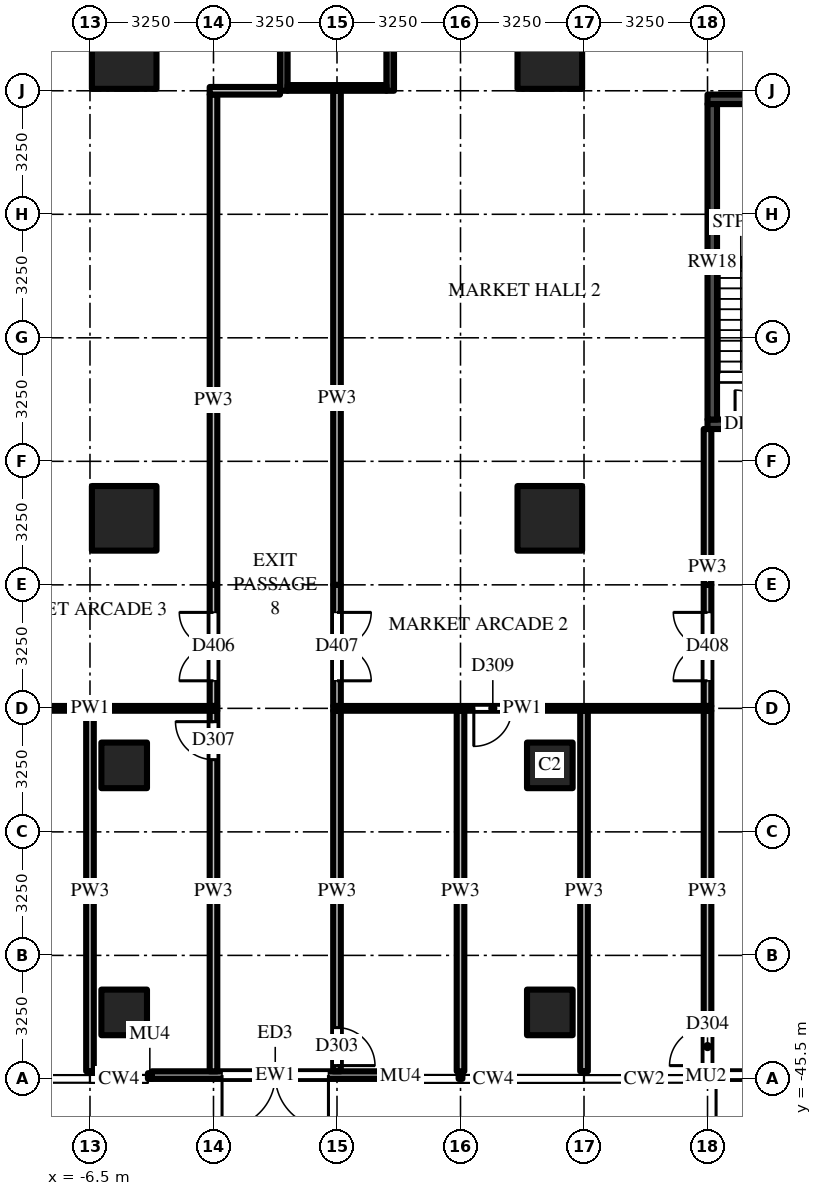
"""IFC4 building model, lengths in metres.
Left out: names, types, materials, properties, quantities, classifications, styles, units other than length and angle.
Written with IfcOpenShell. Run it as: python <this file> out.ifc"""

import sys

from ifc_helpers import new_model, si_unit, direction, frame, frame_2d, origin, origin_2d, place, context, subcontext, project, spatial, rectangle, extrude, source, transform, mapped, element, fill, save


model = new_model("IFC4")
c1 = context("Model", 3, precision=1e-05, world=origin(), true_north=direction((0.0, 1.0)))
c2 = subcontext(c1, "Body", "Model", "MODEL_VIEW")
j1 = project(units=[si_unit("LENGTHUNIT", "METRE"), si_unit("PLANEANGLEUNIT", "RADIAN")], contexts=[c1])
p1 = place(None, origin())
s1 = spatial("IfcSite", under=j1, at=p1, CompositionType="ELEMENT")
p2 = place(p1, origin())
s2 = spatial("IfcBuilding", under=s1, at=p2, CompositionType="ELEMENT")
p3 = place(p2, origin())
s3 = spatial("IfcBuildingStorey", under=s2, at=p3, CompositionType="ELEMENT", Elevation=0.0)
m1 = source(origin(), c2, "Body", "SweptSolid", [
    extrude(rectangle(XDim=1.7, YDim=1.7, at=origin_2d()), origin(), (0.0, 0.0, 1.0), 8.5),
])
for number, where, z_axis, x_axis in (
    (1, (5.6, -18.6, -0.5), (0.0, 0.0, 1.0), (1.0, 0.0, 0.0)),
    (2, (5.6, -30.75, -0.5), (0.0, 0.0, 1.0), (1.0, 0.0, 0.0)),
):
    element("IfcColumn", number, at=place(p3, frame(where, z_axis=z_axis, x_axis=x_axis)), inside=s3, PredefinedType="COLUMN", context=c2, shape_type="MappedRepresentation", body=[
        mapped(m1, transform((0.0, 0.0, 0.0))),
    ])
m2 = source(origin(), c2, "Body", "SweptSolid", [
    extrude(rectangle(XDim=1.2, YDim=1.2, at=origin_2d()), origin(), (0.0, 0.0, 1.0), 8.5),
])
for number, where, z_axis, x_axis in (
    (3, (5.6, -37.25, -0.5), (0.0, 0.0, 1.0), (1.0, 0.0, 0.0)),
    (4, (5.6, -43.75, -0.5), (0.0, 0.0, 1.0), (1.0, 0.0, 0.0)),
):
    element("IfcColumn", number, at=place(p3, frame(where, z_axis=z_axis, x_axis=x_axis)), inside=s3, PredefinedType="COLUMN", context=c2, shape_type="MappedRepresentation", body=[
        mapped(m2, transform((0.0, 0.0, 0.0))),
    ])
for number, where, z_axis, x_axis in (
    (5, (-5.6, -18.6, -0.5), (0.0, 0.0, 1.0), (1.0, 0.0, 0.0)),
    (6, (-5.6, -30.75, -0.5), (0.0, 0.0, 1.0), (1.0, 0.0, 0.0)),
):
    element("IfcColumn", number, at=place(p3, frame(where, z_axis=z_axis, x_axis=x_axis)), inside=s3, PredefinedType="COLUMN", context=c2, shape_type="MappedRepresentation", body=[
        mapped(m1, transform((0.0, 0.0, 0.0))),
    ])
for number, where, z_axis, x_axis in (
    (7, (-5.6, -37.25, -0.5), (0.0, 0.0, 1.0), (1.0, 0.0, 0.0)),
    (8, (-5.6, -43.75, -0.5), (0.0, 0.0, 1.0), (1.0, 0.0, 0.0)),
):
    element("IfcColumn", number, at=place(p3, frame(where, z_axis=z_axis, x_axis=x_axis)), inside=s3, PredefinedType="COLUMN", context=c2, shape_type="MappedRepresentation", body=[
        mapped(m2, transform((0.0, 0.0, 0.0))),
    ])
m3 = source(origin(), c2, "Body", "SweptSolid", [
    extrude(rectangle(XDim=6.0, YDim=0.2, at=frame_2d((3.0, 0.0))), origin(), (0.0, 0.0, 1.0), 7.7),
])
for number, where, z_axis, x_axis in (
    (9, (1.4, -13.5, 0.0), (0.0, 0.0, 1.0), (0.0, -1.0, 0.0)),
    (10, (-1.4, -13.5, 0.0), (0.0, 0.0, 1.0), (0.0, -1.0, 0.0)),
):
    element("IfcWall", number, at=place(p3, frame(where, z_axis=z_axis, x_axis=x_axis)), inside=s3, PredefinedType="SHEAR", context=c2, shape_type="MappedRepresentation", body=[
        mapped(m3, transform((0.0, 0.0, 0.0))),
    ])
m4 = source(origin(), c2, "Body", "SweptSolid", [
    extrude(rectangle(XDim=2.6, YDim=0.15, at=frame_2d((1.3, 0.0))), origin(), (0.0, 0.0, 1.0), 7.7),
])
p4 = place(p3, frame((1.3, -19.425, 0.0), z_axis=(0.0, 0.0, 1.0), x_axis=(-1.0, 0.0, 0.0)))
e11 = element("IfcWall", 11, at=p4, inside=s3, PredefinedType="SHEAR", context=c2, shape_type="MappedRepresentation", body=[
    mapped(m4, transform((0.0, 0.0, 0.0))),
])
m5 = source(origin(), c2, "Body", "SweptSolid", [
    extrude(rectangle(XDim=6.5, YDim=0.25, at=frame_2d((3.25, 0.0))), origin(), (0.0, 0.0, 1.0), 7.7),
])
p5 = place(p3, frame((9.75, -28.275, 0.0), z_axis=(0.0, 0.0, 1.0), x_axis=(1.0, 0.0, 0.0)))
e12 = element("IfcWall", 12, at=p5, inside=s3, PredefinedType="SHEAR", context=c2, shape_type="MappedRepresentation", body=[
    mapped(m5, transform((0.0, 0.0, 0.0))),
])
m6 = source(origin(), c2, "Body", "SweptSolid", [
    extrude(rectangle(XDim=1.8, YDim=2.1, at=frame_2d((0.9, 1.05))), frame((0.0, 0.135, 0.0), z_axis=(0.0, -1.0, 0.0), x_axis=(1.0, 0.0, 0.0)), (0.0, 0.0, 1.0), 0.27),
])
p6 = place(p5, frame((0.725, 0.0, 0.0)))
e13 = element("IfcOpeningElement", 13, at=p6, cuts=e12, PredefinedType="OPENING", context=c2, shape_type="MappedRepresentation", body=[
    mapped(m6, transform((0.0, 0.0, 0.0))),
])
p7 = place(p5, frame((3.975, 0.0, 0.0)))
e14 = element("IfcOpeningElement", 14, at=p7, cuts=e12, PredefinedType="OPENING", context=c2, shape_type="MappedRepresentation", body=[
    mapped(m6, transform((0.0, 0.0, 0.0))),
])
p8 = place(p3, frame((9.75, -19.725, 0.0), z_axis=(0.0, 0.0, 1.0), x_axis=(1.0, 0.0, 0.0)))
e15 = element("IfcWall", 15, at=p8, inside=s3, PredefinedType="SHEAR", context=c2, shape_type="MappedRepresentation", body=[
    mapped(m5, transform((0.0, 0.0, 0.0))),
])
m7 = source(origin(), c2, "Body", "SweptSolid", [
    extrude(rectangle(XDim=8.3, YDim=0.25, at=frame_2d((4.15, 0.0))), origin(), (0.0, 0.0, 1.0), 7.7),
])
p9 = place(p3, frame((9.875, -28.15, 0.0), z_axis=(0.0, 0.0, 1.0), x_axis=(0.0, 1.0, 0.0)))
e16 = element("IfcWall", 16, at=p9, inside=s3, PredefinedType="SHEAR", context=c2, shape_type="MappedRepresentation", body=[
    mapped(m7, transform((0.0, 0.0, 0.0))),
])
m8 = source(origin(), c2, "Body", "SweptSolid", [
    extrude(rectangle(XDim=6.5, YDim=0.2, at=frame_2d((3.25, 0.0))), origin(), (0.0, 0.0, 1.0), 7.7),
])
p10 = place(p3, frame((1.625, -45.4, 0.0), z_axis=(0.0, 0.0, 1.0), x_axis=(-1.0, 0.0, 0.0)))
e17 = element("IfcWall", 17, at=p10, inside=s3, PredefinedType="SOLIDWALL", context=c2, shape_type="MappedRepresentation", body=[
    mapped(m8, transform((0.0, 0.0, 0.0))),
])
m9 = source(origin(), c2, "Body", "SweptSolid", [
    extrude(rectangle(XDim=2.8, YDim=2.6, at=frame_2d((1.4, 1.3))), frame((0.0, 0.11, 0.0), z_axis=(0.0, -1.0, 0.0), x_axis=(1.0, 0.0, 0.0)), (0.0, 0.0, 1.0), 0.22),
])
p11 = place(p10, frame((1.85, 0.0, 0.0)))
e18 = element("IfcOpeningElement", 18, at=p11, cuts=e17, PredefinedType="OPENING", context=c2, shape_type="MappedRepresentation", body=[
    mapped(m9, transform((0.0, 0.0, 0.0))),
])
m10 = source(origin(), c2, "Body", "SweptSolid", [
    extrude(rectangle(XDim=3.25, YDim=0.2, at=frame_2d((1.625, 0.0))), origin(), (0.0, 0.0, 1.0), 7.7),
])
p12 = place(p3, frame((13.0, -45.4, 0.0), z_axis=(0.0, 0.0, 1.0), x_axis=(-1.0, 0.0, 0.0)))
e19 = element("IfcWall", 19, at=p12, inside=s3, PredefinedType="SOLIDWALL", context=c2, shape_type="MappedRepresentation", body=[
    mapped(m10, transform((0.0, 0.0, 0.0))),
])
m11 = source(origin(), c2, "Body", "SweptSolid", [
    extrude(rectangle(XDim=2.8, YDim=2.4, at=frame_2d((1.4, 1.2))), frame((0.0, 0.11, 0.0), z_axis=(0.0, -1.0, 0.0), x_axis=(1.0, 0.0, 0.0)), (0.0, 0.0, 1.0), 0.22),
])
p13 = place(p12, frame((0.225, 0.0, 0.0)))
e20 = element("IfcOpeningElement", 20, at=p13, cuts=e19, PredefinedType="OPENING", context=c2, shape_type="MappedRepresentation", body=[
    mapped(m11, transform((0.0, 0.0, 0.0))),
])
m12 = source(origin(), c2, "Body", "SweptSolid", [
    extrude(rectangle(XDim=9.488, YDim=0.2, at=frame_2d((4.744, 0.0))), origin(), (0.0, 0.0, 1.0), 6.762),
])
p14 = place(p3, frame((-6.5, -45.3, 0.0), z_axis=(0.0, 0.0, 1.0), x_axis=(0.0, 1.0, 0.0)))
e21 = element("IfcWall", 21, at=p14, inside=s3, PredefinedType="PARTITIONING", context=c2, shape_type="MappedRepresentation", body=[
    mapped(m12, transform((0.0, 0.0, 0.0))),
])
m13 = source(origin(), c2, "Body", "SweptSolid", [
    extrude(rectangle(XDim=3.188, YDim=0.2, at=frame_2d((1.594, 0.0))), origin(), (0.0, 0.0, 1.0), 6.997),
])
p15 = place(p3, frame((-3.25, -35.688, 0.0), z_axis=(0.0, 0.0, 1.0), x_axis=(0.0, 1.0, 0.0)))
e22 = element("IfcWall", 22, at=p15, inside=s3, PredefinedType="PARTITIONING", context=c2, shape_type="MappedRepresentation", body=[
    mapped(m13, transform((0.0, 0.0, 0.0))),
])
m14 = source(origin(), c2, "Body", "SweptSolid", [
    extrude(rectangle(XDim=1.8, YDim=2.1, at=frame_2d((0.9, 1.05))), frame((0.0, 0.11, 0.0), z_axis=(0.0, -1.0, 0.0), x_axis=(1.0, 0.0, 0.0)), (0.0, 0.0, 1.0), 0.22),
])
p16 = place(p15, frame((0.663, 0.0, 0.0)))
e23 = element("IfcOpeningElement", 23, at=p16, cuts=e22, PredefinedType="OPENING", context=c2, shape_type="MappedRepresentation", body=[
    mapped(m14, transform((0.0, 0.0, 0.0))),
])
m15 = source(origin(), c2, "Body", "SweptSolid", [
    extrude(rectangle(XDim=9.488, YDim=0.2, at=frame_2d((4.744, 0.0))), origin(), (0.0, 0.0, 1.0), 6.918),
])
p17 = place(p3, frame((-3.25, -45.3, 0.0), z_axis=(0.0, 0.0, 1.0), x_axis=(0.0, 1.0, 0.0)))
e24 = element("IfcWall", 24, at=p17, inside=s3, PredefinedType="PARTITIONING", context=c2, shape_type="MappedRepresentation", body=[
    mapped(m15, transform((0.0, 0.0, 0.0))),
])
m16 = source(origin(), c2, "Body", "SweptSolid", [
    extrude(rectangle(XDim=1.0, YDim=2.1, at=frame_2d((0.5, 1.05))), frame((0.0, 0.11, 0.0), z_axis=(0.0, -1.0, 0.0), x_axis=(1.0, 0.0, 0.0)), (0.0, 0.0, 1.0), 0.22),
])
p18 = place(p17, frame((8.2, 0.0, 0.0)))
e25 = element("IfcOpeningElement", 25, at=p18, cuts=e24, PredefinedType="OPENING", context=c2, shape_type="MappedRepresentation", body=[
    mapped(m16, transform((0.0, 0.0, 0.0))),
])
m17 = source(origin(), c2, "Body", "SweptSolid", [
    extrude(rectangle(XDim=12.9, YDim=0.2, at=frame_2d((6.45, 0.0))), origin(), (0.0, 0.0, 1.0), 6.918),
])
p19 = place(p3, frame((-3.25, -32.5, 0.0), z_axis=(0.0, 0.0, 1.0), x_axis=(0.0, 1.0, 0.0)))
e26 = element("IfcWall", 26, at=p19, inside=s3, PredefinedType="PARTITIONING", context=c2, shape_type="MappedRepresentation", body=[
    mapped(m17, transform((0.0, 0.0, 0.0))),
])
p20 = place(p3, frame((0.0, -32.5, 0.0), z_axis=(0.0, 0.0, 1.0), x_axis=(0.0, -1.0, 0.0)))
e27 = element("IfcWall", 27, at=p20, inside=s3, PredefinedType="PARTITIONING", context=c2, shape_type="MappedRepresentation", body=[
    mapped(m13, transform((0.0, 0.0, 0.0))),
])
p21 = place(p20, frame((0.725, 0.0, 0.0)))
e28 = element("IfcOpeningElement", 28, at=p21, cuts=e27, PredefinedType="OPENING", context=c2, shape_type="MappedRepresentation", body=[
    mapped(m14, transform((0.0, 0.0, 0.0))),
])
p22 = place(p3, frame((0.0, -35.812, 0.0), z_axis=(0.0, 0.0, 1.0), x_axis=(0.0, -1.0, 0.0)))
e29 = element("IfcWall", 29, at=p22, inside=s3, PredefinedType="PARTITIONING", context=c2, shape_type="MappedRepresentation", body=[
    mapped(m15, transform((0.0, 0.0, 0.0))),
])
p23 = place(p22, frame((8.337, 0.0, 0.0)))
e30 = element("IfcOpeningElement", 30, at=p23, cuts=e29, PredefinedType="OPENING", context=c2, shape_type="MappedRepresentation", body=[
    mapped(m16, transform((0.0, 0.0, 0.0))),
])
m18 = source(origin(), c2, "Body", "SweptSolid", [
    extrude(rectangle(XDim=13.0, YDim=0.2, at=frame_2d((6.5, 0.0))), origin(), (0.0, 0.0, 1.0), 6.918),
])
p24 = place(p3, frame((0.0, -32.5, 0.0), z_axis=(0.0, 0.0, 1.0), x_axis=(0.0, 1.0, 0.0)))
e31 = element("IfcWall", 31, at=p24, inside=s3, PredefinedType="PARTITIONING", context=c2, shape_type="MappedRepresentation", body=[
    mapped(m18, transform((0.0, 0.0, 0.0))),
])
p25 = place(p3, frame((3.25, -45.3, 0.0), z_axis=(0.0, 0.0, 1.0), x_axis=(0.0, 1.0, 0.0)))
e32 = element("IfcWall", 32, at=p25, inside=s3, PredefinedType="PARTITIONING", context=c2, shape_type="MappedRepresentation", body=[
    mapped(m15, transform((0.0, 0.0, 0.0))),
])
p26 = place(p3, frame((6.5, -45.3, 0.0), z_axis=(0.0, 0.0, 1.0), x_axis=(0.0, 1.0, 0.0)))
e33 = element("IfcWall", 33, at=p26, inside=s3, PredefinedType="PARTITIONING", context=c2, shape_type="MappedRepresentation", body=[
    mapped(m12, transform((0.0, 0.0, 0.0))),
])
p27 = place(p3, frame((9.75, -35.688, 0.0), z_axis=(0.0, 0.0, 1.0), x_axis=(0.0, 1.0, 0.0)))
e34 = element("IfcWall", 34, at=p27, inside=s3, PredefinedType="PARTITIONING", context=c2, shape_type="MappedRepresentation", body=[
    mapped(m13, transform((0.0, 0.0, 0.0))),
])
p28 = place(p27, frame((0.663, 0.0, 0.0)))
e35 = element("IfcOpeningElement", 35, at=p28, cuts=e34, PredefinedType="OPENING", context=c2, shape_type="MappedRepresentation", body=[
    mapped(m14, transform((0.0, 0.0, 0.0))),
])
p29 = place(p3, frame((9.75, -45.3, 0.0), z_axis=(0.0, 0.0, 1.0), x_axis=(0.0, 1.0, 0.0)))
e36 = element("IfcWall", 36, at=p29, inside=s3, PredefinedType="PARTITIONING", context=c2, shape_type="MappedRepresentation", body=[
    mapped(m12, transform((0.0, 0.0, 0.0))),
])
p30 = place(p29, frame((0.15, 0.0, 0.0)))
e37 = element("IfcOpeningElement", 37, at=p30, cuts=e36, PredefinedType="OPENING", context=c2, shape_type="MappedRepresentation", body=[
    mapped(m16, transform((0.0, 0.0, 0.0))),
])
m19 = source(origin(), c2, "Body", "SweptSolid", [
    extrude(rectangle(XDim=4.1, YDim=0.2, at=frame_2d((2.05, 0.0))), origin(), (0.0, 0.0, 1.0), 6.762),
])
p31 = place(p3, frame((9.75, -32.5, 0.0), z_axis=(0.0, 0.0, 1.0), x_axis=(0.0, 1.0, 0.0)))
e38 = element("IfcWall", 38, at=p31, inside=s3, PredefinedType="PARTITIONING", context=c2, shape_type="MappedRepresentation", body=[
    mapped(m19, transform((0.0, 0.0, 0.0))),
])
p32 = place(p3, frame((-3.15, -35.75, 0.0), z_axis=(0.0, 0.0, 1.0), x_axis=(-1.0, 0.0, 0.0)))
e39 = element("IfcWall", 39, at=p32, inside=s3, PredefinedType="PARTITIONING", context=c2, shape_type="SweptSolid", body=[
    extrude(rectangle(XDim=6.7, YDim=0.125, at=frame_2d((3.35, 0.0))), origin(), (0.0, 0.0, 1.0), 6.997),
])
p33 = place(p3, frame((9.85, -35.75, 0.0), z_axis=(0.0, 0.0, 1.0), x_axis=(-1.0, 0.0, 0.0)))
e40 = element("IfcWall", 40, at=p33, inside=s3, PredefinedType="PARTITIONING", context=c2, shape_type="SweptSolid", body=[
    extrude(rectangle(XDim=9.95, YDim=0.125, at=frame_2d((4.975, 0.0))), origin(), (0.0, 0.0, 1.0), 6.997),
])
m20 = source(origin(), c2, "Body", "SweptSolid", [
    extrude(rectangle(XDim=1.0, YDim=2.1, at=frame_2d((0.5, 1.05))), frame((0.0, 0.073, 0.0), z_axis=(0.0, -1.0, 0.0), x_axis=(1.0, 0.0, 0.0)), (0.0, 0.0, 1.0), 0.145),
])
p34 = place(p33, frame((5.25, 0.0, 0.0)))
e41 = element("IfcOpeningElement", 41, at=p34, cuts=e40, PredefinedType="OPENING", context=c2, shape_type="MappedRepresentation", body=[
    mapped(m20, transform((0.0, 0.0, 0.0))),
])
m21 = source(origin(), c2, "Body", "SweptSolid", [
    extrude(rectangle(XDim=1.85, YDim=0.2, at=frame_2d((0.925, 0.0))), origin(), (0.0, 0.0, 1.0), 6.997),
])
p35 = place(p3, frame((-3.35, -19.5, 0.0), z_axis=(0.0, 0.0, 1.0), x_axis=(1.0, 0.0, 0.0)))
e42 = element("IfcWall", 42, at=p35, inside=s3, PredefinedType="PARTITIONING", context=c2, shape_type="MappedRepresentation", body=[
    mapped(m21, transform((0.0, 0.0, 0.0))),
])
m22 = source(origin(), c2, "Body", "SweptSolid", [
    extrude(rectangle(XDim=1.8, YDim=2.1, at=frame_2d((0.9, 1.05))), frame((0.0, 0.025, 0.0), z_axis=(0.0, -1.0, 0.0), x_axis=(1.0, 0.0, 0.0)), (0.0, 0.0, 1.0), 0.05),
])
p36 = place(p6, origin())
e43 = element("IfcDoor", 43, at=p36, inside=s3, OperationType="DOUBLE_DOOR_SINGLE_SWING", PredefinedType="DOOR", context=c2, shape_type="MappedRepresentation", body=[
    mapped(m22, transform((0.0, 0.0, 0.0))),
])
fill(e13, e43)
m23 = source(origin(), c2, "Body", "SweptSolid", [
    extrude(rectangle(XDim=2.8, YDim=2.6, at=frame_2d((1.4, 1.3))), frame((0.0, 0.025, 0.0), z_axis=(0.0, -1.0, 0.0), x_axis=(1.0, 0.0, 0.0)), (0.0, 0.0, 1.0), 0.05),
])
p37 = place(p11, origin())
e44 = element("IfcDoor", 44, at=p37, inside=s3, OperationType="DOUBLE_DOOR_SINGLE_SWING", PredefinedType="DOOR", context=c2, shape_type="MappedRepresentation", body=[
    mapped(m23, transform((0.0, 0.0, 0.0))),
])
fill(e18, e44)
m24 = source(origin(), c2, "Body", "SweptSolid", [
    extrude(rectangle(XDim=2.8, YDim=2.4, at=frame_2d((1.4, 1.2))), frame((0.0, 0.025, 0.0), z_axis=(0.0, -1.0, 0.0), x_axis=(1.0, 0.0, 0.0)), (0.0, 0.0, 1.0), 0.05),
])
p38 = place(p13, origin())
e45 = element("IfcDoor", 45, at=p38, inside=s3, OperationType="DOUBLE_DOOR_SINGLE_SWING", PredefinedType="DOOR", context=c2, shape_type="MappedRepresentation", body=[
    mapped(m24, transform((0.0, 0.0, 0.0))),
])
fill(e20, e45)
m25 = source(origin(), c2, "Body", "SweptSolid", [
    extrude(rectangle(XDim=1.0, YDim=2.1, at=frame_2d((0.5, 1.05))), frame((0.0, 0.025, 0.0), z_axis=(0.0, -1.0, 0.0), x_axis=(1.0, 0.0, 0.0)), (0.0, 0.0, 1.0), 0.05),
])
p39 = place(p23, origin())
e46 = element("IfcDoor", 46, at=p39, inside=s3, OperationType="SINGLE_SWING_RIGHT", PredefinedType="DOOR", context=c2, shape_type="MappedRepresentation", body=[
    mapped(m25, transform((0.0, 0.0, 0.0))),
])
fill(e30, e46)
p40 = place(p30, origin())
e47 = element("IfcDoor", 47, at=p40, inside=s3, OperationType="SINGLE_SWING_LEFT", PredefinedType="DOOR", context=c2, shape_type="MappedRepresentation", body=[
    mapped(m25, transform((0.0, 0.0, 0.0))),
])
fill(e37, e47)
p41 = place(p18, origin())
e48 = element("IfcDoor", 48, at=p41, inside=s3, OperationType="SINGLE_SWING_RIGHT", PredefinedType="DOOR", context=c2, shape_type="MappedRepresentation", body=[
    mapped(m25, transform((0.0, 0.0, 0.0))),
])
fill(e25, e48)
p42 = place(p34, origin())
e49 = element("IfcDoor", 49, at=p42, inside=s3, OperationType="SINGLE_SWING_RIGHT", PredefinedType="DOOR", context=c2, shape_type="MappedRepresentation", body=[
    mapped(m25, transform((0.0, 0.0, 0.0))),
])
fill(e41, e49)
p43 = place(p16, origin())
e50 = element("IfcDoor", 50, at=p43, inside=s3, OperationType="DOUBLE_DOOR_SINGLE_SWING", PredefinedType="DOOR", context=c2, shape_type="MappedRepresentation", body=[
    mapped(m22, transform((0.0, 0.0, 0.0))),
])
fill(e23, e50)
p44 = place(p21, origin())
e51 = element("IfcDoor", 51, at=p44, inside=s3, OperationType="DOUBLE_DOOR_SINGLE_SWING", PredefinedType="DOOR", context=c2, shape_type="MappedRepresentation", body=[
    mapped(m22, transform((0.0, 0.0, 0.0))),
])
fill(e28, e51)
p45 = place(p28, origin())
e52 = element("IfcDoor", 52, at=p45, inside=s3, OperationType="DOUBLE_DOOR_SINGLE_SWING", PredefinedType="DOOR", context=c2, shape_type="MappedRepresentation", body=[
    mapped(m22, transform((0.0, 0.0, 0.0))),
])
fill(e35, e52)
save(model, sys.argv[1])
